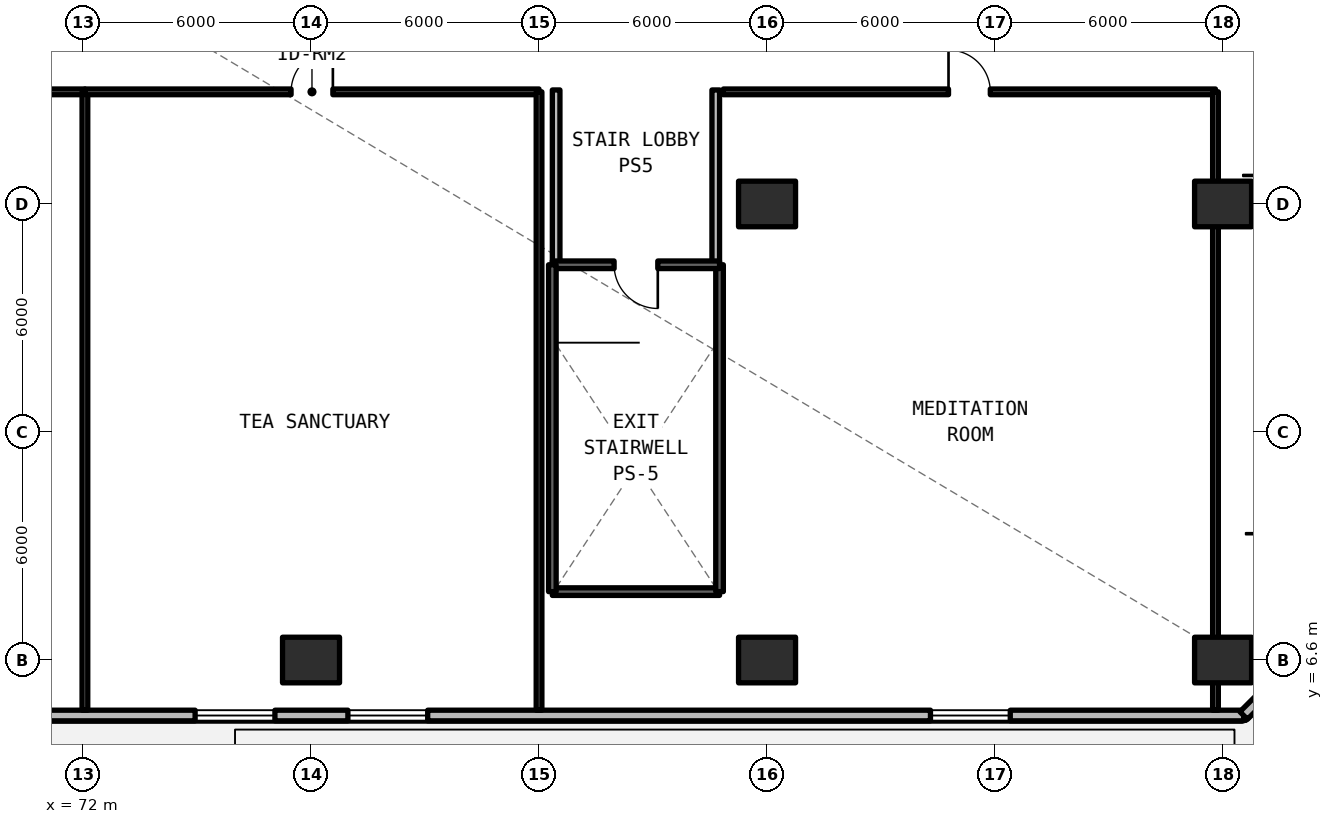
"""IFC4 building model, lengths in metres.
Left out: names, types, materials, properties, quantities, classifications, styles, units other than length and angle.
Written with IfcOpenShell. Run it as: python <this file> out.ifc"""

import sys

from ifc_helpers import new_model, si_unit, direction, frame, frame_2d, origin, origin_2d, place, context, subcontext, project, spatial, rectangle, extrude, element, fill, save


model = new_model("IFC4")
c1 = context("Model", 3, precision=1e-05, world=origin(), true_north=direction((0.0, 1.0)))
c2 = subcontext(c1, "Body", "Model", "MODEL_VIEW")
j1 = project(units=[si_unit("LENGTHUNIT", "METRE"), si_unit("PLANEANGLEUNIT", "RADIAN")], contexts=[c1])
p1 = place(None, origin())
s1 = spatial("IfcSite", under=j1, at=p1, CompositionType="ELEMENT")
p2 = place(p1, origin())
s2 = spatial("IfcBuilding", under=s1, at=p2, CompositionType="ELEMENT")
p3 = place(p2, frame((0.0, 0.0, 24.09)))
s3 = spatial("IfcBuildingStorey", under=s2, at=p3, CompositionType="ELEMENT", Elevation=24.09)
for number, where, z_axis, x_axis in (
    (1, (78.0, 6.6, 0.0), (0.0, 0.0, 1.0), (1.0, 0.0, 0.0)),
    (2, (90.0, 6.6, 0.0), (0.0, 0.0, 1.0), (1.0, 0.0, 0.0)),
    (3, (102.0, 6.6, 0.0), (0.0, 0.0, 1.0), (1.0, 0.0, 0.0)),
):
    element("IfcColumn", number, at=place(p3, frame(where, z_axis=z_axis, x_axis=x_axis)), inside=s3, PredefinedType="COLUMN", context=c2, shape_type="SweptSolid", body=[
        extrude(rectangle(XDim=1.5, YDim=1.2, at=origin_2d()), origin(), (0.0, 0.0, 1.0), 4.71),
    ])
p4 = place(p3, frame((90.0, 18.6, 0.0), z_axis=(0.0, 0.0, 1.0), x_axis=(1.0, 0.0, 0.0)))
e4 = element("IfcColumn", 4, at=p4, inside=s3, PredefinedType="COLUMN", context=c2, shape_type="SweptSolid", body=[
    extrude(rectangle(XDim=1.5, YDim=1.2, at=origin_2d()), origin(), (0.0, 0.0, 1.0), 4.95),
])
p5 = place(p3, frame((102.0, 18.6, 0.0), z_axis=(0.0, 0.0, 1.0), x_axis=(1.0, 0.0, 0.0)))
e5 = element("IfcColumn", 5, at=p5, inside=s3, PredefinedType="COLUMN", context=c2, shape_type="SweptSolid", body=[
    extrude(rectangle(XDim=1.5, YDim=1.2, at=origin_2d()), origin(), (0.0, 0.0, 1.0), 4.71),
])
p6 = place(p3, frame((11.458, 5.14, 0.0), z_axis=(0.0, 0.0, 1.0), x_axis=(1.0, 0.0, 0.0)))
e6 = element("IfcWall", 6, at=p6, inside=s3, PredefinedType="SOLIDWALL", context=c2, shape_type="SweptSolid", body=[
    extrude(rectangle(XDim=91.084, YDim=0.28, at=frame_2d((45.542, 0.0))), origin(), (0.0, 0.0, 1.0), 4.71),
])
p7 = place(p6, frame((44.792, 0.0, 0.0)))
e7 = element("IfcOpeningElement", 7, at=p7, cuts=e6, PredefinedType="OPENING", context=c2, shape_type="SweptSolid", body=[
    extrude(rectangle(XDim=1.5, YDim=2.2, at=frame_2d((0.75, 1.1))), frame((0.0, 0.15, 0.0), z_axis=(0.0, -1.0, 0.0), x_axis=(1.0, 0.0, 0.0)), (0.0, 0.0, 1.0), 0.3),
])
p8 = place(p6, frame((25.582, 0.0, 0.78)))
e8 = element("IfcOpeningElement", 8, at=p8, cuts=e6, PredefinedType="OPENING", context=c2, shape_type="SweptSolid", body=[
    extrude(rectangle(XDim=2.1, YDim=1.66, at=frame_2d((1.05, 0.83))), frame((0.0, 0.15, 0.0), z_axis=(0.0, -1.0, 0.0), x_axis=(1.0, 0.0, 0.0)), (0.0, 0.0, 1.0), 0.3),
])
p9 = place(p6, frame((67.512, 0.0, 0.78)))
e9 = element("IfcOpeningElement", 9, at=p9, cuts=e6, PredefinedType="OPENING", context=c2, shape_type="SweptSolid", body=[
    extrude(rectangle(XDim=2.1, YDim=1.66, at=frame_2d((1.05, 0.83))), frame((0.0, 0.15, 0.0), z_axis=(0.0, -1.0, 0.0), x_axis=(1.0, 0.0, 0.0)), (0.0, 0.0, 1.0), 0.3),
])
p10 = place(p6, frame((5.892, 0.0, 0.78)))
e10 = element("IfcOpeningElement", 10, at=p10, cuts=e6, PredefinedType="OPENING", context=c2, shape_type="SweptSolid", body=[
    extrude(rectangle(XDim=2.1, YDim=1.66, at=frame_2d((1.05, 0.83))), frame((0.0, 0.15, 0.0), z_axis=(0.0, -1.0, 0.0), x_axis=(1.0, 0.0, 0.0)), (0.0, 0.0, 1.0), 0.3),
])
p11 = place(p6, frame((82.842, 0.0, 0.78)))
e11 = element("IfcOpeningElement", 11, at=p11, cuts=e6, PredefinedType="OPENING", context=c2, shape_type="SweptSolid", body=[
    extrude(rectangle(XDim=2.1, YDim=1.66, at=frame_2d((1.05, 0.83))), frame((0.0, 0.15, 0.0), z_axis=(0.0, -1.0, 0.0), x_axis=(1.0, 0.0, 0.0)), (0.0, 0.0, 1.0), 0.3),
])
p12 = place(p6, frame((14.892, 0.0, 0.78)))
e12 = element("IfcOpeningElement", 12, at=p12, cuts=e6, PredefinedType="OPENING", context=c2, shape_type="SweptSolid", body=[
    extrude(rectangle(XDim=2.1, YDim=1.66, at=frame_2d((1.05, 0.83))), frame((0.0, 0.15, 0.0), z_axis=(0.0, -1.0, 0.0), x_axis=(1.0, 0.0, 0.0)), (0.0, 0.0, 1.0), 0.3),
])
p13 = place(p6, frame((53.992, 0.0, 0.78)))
e13 = element("IfcOpeningElement", 13, at=p13, cuts=e6, PredefinedType="OPENING", context=c2, shape_type="SweptSolid", body=[
    extrude(rectangle(XDim=2.1, YDim=1.66, at=frame_2d((1.05, 0.83))), frame((0.0, 0.15, 0.0), z_axis=(0.0, -1.0, 0.0), x_axis=(1.0, 0.0, 0.0)), (0.0, 0.0, 1.0), 0.3),
])
p14 = place(p6, frame((63.492, 0.0, 0.78)))
e14 = element("IfcOpeningElement", 14, at=p14, cuts=e6, PredefinedType="OPENING", context=c2, shape_type="SweptSolid", body=[
    extrude(rectangle(XDim=2.1, YDim=1.66, at=frame_2d((1.05, 0.83))), frame((0.0, 0.15, 0.0), z_axis=(0.0, -1.0, 0.0), x_axis=(1.0, 0.0, 0.0)), (0.0, 0.0, 1.0), 0.3),
])
p15 = place(p3, frame((102.542, 5.14, 0.0), z_axis=(0.0, 0.0, 1.0), x_axis=(0.707106781187, 0.707106781187, 0.0)))
e15 = element("IfcWall", 15, at=p15, inside=s3, PredefinedType="SOLIDWALL", context=c2, shape_type="SweptSolid", body=[
    extrude(rectangle(XDim=3.278, YDim=0.28, at=frame_2d((1.639, 0.0))), origin(), (0.0, 0.0, 1.0), 4.71),
])
p16 = place(p15, frame((1.534, 0.0, 0.78)))
e16 = element("IfcOpeningElement", 16, at=p16, cuts=e15, PredefinedType="OPENING", context=c2, shape_type="SweptSolid", body=[
    extrude(rectangle(XDim=0.85, YDim=1.65, at=frame_2d((0.425, 0.825))), frame((0.0, 0.15, 0.0), z_axis=(0.0, -1.0, 0.0), x_axis=(1.0, 0.0, 0.0)), (0.0, 0.0, 1.0), 0.3),
])
for number, where, z_axis, x_axis in (
    (17, (84.45, 17.0, 0.0), (0.0, 0.0, 1.0), (0.0, 1.0, 0.0)),
    (18, (88.65, 17.0, 0.0), (0.0, 0.0, 1.0), (0.0, 1.0, 0.0)),
):
    element("IfcWall", number, at=place(p3, frame(where, z_axis=z_axis, x_axis=x_axis)), inside=s3, PredefinedType="SOLIDWALL", context=c2, shape_type="SweptSolid", body=[
        extrude(rectangle(XDim=4.6, YDim=0.2, at=frame_2d((2.3, 0.0))), origin(), (0.0, 0.0, 1.0), 3.93),
    ])
p17 = place(p3, frame((48.75, 21.55, 0.0), z_axis=(0.0, 0.0, 1.0), x_axis=(1.0, 0.0, 0.0)))
e19 = element("IfcWall", 19, at=p17, inside=s3, PredefinedType="SOLIDWALL", context=c2, shape_type="SweptSolid", body=[
    extrude(rectangle(XDim=23.3, YDim=0.15, at=frame_2d((11.65, 0.0))), origin(), (0.0, 0.0, 1.0), 3.93),
])
p18 = place(p17, frame((10.8, 0.0, 0.0)))
e20 = element("IfcOpeningElement", 20, at=p18, cuts=e19, PredefinedType="OPENING", context=c2, shape_type="SweptSolid", body=[
    extrude(rectangle(XDim=1.4, YDim=2.15, at=frame_2d((0.7, 1.075))), frame((0.0, 0.085, 0.0), z_axis=(0.0, -1.0, 0.0), x_axis=(1.0, 0.0, 0.0)), (0.0, 0.0, 1.0), 0.17),
])
p19 = place(p3, frame((72.05, 5.28, 0.0), z_axis=(0.0, 0.0, 1.0), x_axis=(0.0, 1.0, 0.0)))
e21 = element("IfcWall", 21, at=p19, inside=s3, PredefinedType="SOLIDWALL", context=c2, shape_type="SweptSolid", body=[
    extrude(rectangle(XDim=16.27, YDim=0.15, at=frame_2d((8.135, 0.0))), origin(), (0.0, 0.0, 1.0), 3.687),
])
p20 = place(p3, frame((72.05, 21.55, 0.0), z_axis=(0.0, 0.0, 1.0), x_axis=(1.0, 0.0, 0.0)))
e22 = element("IfcWall", 22, at=p20, inside=s3, PredefinedType="SOLIDWALL", context=c2, shape_type="SweptSolid", body=[
    extrude(rectangle(XDim=11.95, YDim=0.15, at=frame_2d((5.975, 0.0))), origin(), (0.0, 0.0, 1.0), 3.93),
])
p21 = place(p20, frame((5.425, 0.0, 0.0)))
e23 = element("IfcOpeningElement", 23, at=p21, cuts=e22, PredefinedType="OPENING", context=c2, shape_type="SweptSolid", body=[
    extrude(rectangle(XDim=1.1, YDim=2.15, at=frame_2d((0.55, 1.075))), frame((0.0, 0.085, 0.0), z_axis=(0.0, -1.0, 0.0), x_axis=(1.0, 0.0, 0.0)), (0.0, 0.0, 1.0), 0.17),
])
p22 = place(p3, frame((84.0, 5.28, 0.0), z_axis=(0.0, 0.0, 1.0), x_axis=(0.0, 1.0, 0.0)))
e24 = element("IfcWall", 24, at=p22, inside=s3, PredefinedType="SOLIDWALL", context=c2, shape_type="SweptSolid", body=[
    extrude(rectangle(XDim=16.27, YDim=0.15, at=frame_2d((8.135, 0.0))), origin(), (0.0, 0.0, 1.0), 3.687),
])
p23 = place(p3, frame((88.85, 21.55, 0.0), z_axis=(0.0, 0.0, 1.0), x_axis=(1.0, 0.0, 0.0)))
e25 = element("IfcWall", 25, at=p23, inside=s3, PredefinedType="SOLIDWALL", context=c2, shape_type="SweptSolid", body=[
    extrude(rectangle(XDim=12.95, YDim=0.15, at=frame_2d((6.475, 0.0))), origin(), (0.0, 0.0, 1.0), 3.93),
])
p24 = place(p23, frame((5.925, 0.0, 0.0)))
e26 = element("IfcOpeningElement", 26, at=p24, cuts=e25, PredefinedType="OPENING", context=c2, shape_type="SweptSolid", body=[
    extrude(rectangle(XDim=1.1, YDim=2.15, at=frame_2d((0.55, 1.075))), frame((0.0, 0.085, 0.0), z_axis=(0.0, -1.0, 0.0), x_axis=(1.0, 0.0, 0.0)), (0.0, 0.0, 1.0), 0.17),
])
p25 = place(p3, frame((101.8, 5.28, 0.0), z_axis=(0.0, 0.0, 1.0), x_axis=(0.0, 1.0, 0.0)))
e27 = element("IfcWall", 27, at=p25, inside=s3, PredefinedType="SOLIDWALL", context=c2, shape_type="SweptSolid", body=[
    extrude(rectangle(XDim=16.27, YDim=0.15, at=frame_2d((8.135, 0.0))), origin(), (0.0, 0.0, 1.0), 3.93),
])
p26 = place(p3, frame((84.35, 8.4, 0.0), z_axis=(0.0, 0.0, 1.0), x_axis=(1.0, 0.0, 0.0)))
e28 = element("IfcWall", 28, at=p26, inside=s3, PredefinedType="SOLIDWALL", context=c2, shape_type="SweptSolid", body=[
    extrude(rectangle(XDim=4.4, YDim=0.2, at=frame_2d((2.2, 0.0))), origin(), (0.0, 0.0, 1.0), 4.95),
])
p27 = place(p3, frame((88.75, 8.4, 0.0), z_axis=(0.0, 0.0, 1.0), x_axis=(0.0, 1.0, 0.0)))
e29 = element("IfcWall", 29, at=p27, inside=s3, PredefinedType="SOLIDWALL", context=c2, shape_type="SweptSolid", body=[
    extrude(rectangle(XDim=8.6, YDim=0.2, at=frame_2d((4.3, 0.0))), origin(), (0.0, 0.0, 1.0), 4.95),
])
p28 = place(p3, frame((88.75, 17.0, 0.0), z_axis=(0.0, 0.0, 1.0), x_axis=(-1.0, 0.0, 0.0)))
e30 = element("IfcWall", 30, at=p28, inside=s3, PredefinedType="SOLIDWALL", context=c2, shape_type="SweptSolid", body=[
    extrude(rectangle(XDim=4.4, YDim=0.2, at=frame_2d((2.2, 0.0))), origin(), (0.0, 0.0, 1.0), 4.95),
])
p29 = place(p28, frame((1.625, 0.0, 0.0)))
e31 = element("IfcOpeningElement", 31, at=p29, cuts=e30, PredefinedType="OPENING", context=c2, shape_type="SweptSolid", body=[
    extrude(rectangle(XDim=1.15, YDim=2.15, at=frame_2d((0.575, 1.075))), frame((0.0, 0.11, 0.0), z_axis=(0.0, -1.0, 0.0), x_axis=(1.0, 0.0, 0.0)), (0.0, 0.0, 1.0), 0.22),
])
p30 = place(p3, frame((84.35, 17.0, 0.0), z_axis=(0.0, 0.0, 1.0), x_axis=(0.0, -1.0, 0.0)))
e32 = element("IfcWall", 32, at=p30, inside=s3, PredefinedType="SOLIDWALL", context=c2, shape_type="SweptSolid", body=[
    extrude(rectangle(XDim=8.6, YDim=0.2, at=frame_2d((4.3, 0.0))), origin(), (0.0, 0.0, 1.0), 4.95),
])
p31 = place(p9, origin())
e33 = element("IfcWindow", 33, at=p31, inside=s3, PartitioningType="SINGLE_PANEL", PredefinedType="WINDOW", context=c2, shape_type="SweptSolid", body=[
    extrude(rectangle(XDim=2.1, YDim=1.66, at=frame_2d((1.05, 0.83))), frame((0.0, 0.03, 0.0), z_axis=(0.0, -1.0, 0.0), x_axis=(1.0, 0.0, 0.0)), (0.0, 0.0, 1.0), 0.06),
])
fill(e9, e33)
p32 = place(p11, origin())
e34 = element("IfcWindow", 34, at=p32, inside=s3, PartitioningType="SINGLE_PANEL", PredefinedType="WINDOW", context=c2, shape_type="SweptSolid", body=[
    extrude(rectangle(XDim=2.1, YDim=1.66, at=frame_2d((1.05, 0.83))), frame((0.0, 0.03, 0.0), z_axis=(0.0, -1.0, 0.0), x_axis=(1.0, 0.0, 0.0)), (0.0, 0.0, 1.0), 0.06),
])
fill(e11, e34)
p33 = place(p14, origin())
e35 = element("IfcWindow", 35, at=p33, inside=s3, PartitioningType="SINGLE_PANEL", PredefinedType="WINDOW", context=c2, shape_type="SweptSolid", body=[
    extrude(rectangle(XDim=2.1, YDim=1.66, at=frame_2d((1.05, 0.83))), frame((0.0, 0.03, 0.0), z_axis=(0.0, -1.0, 0.0), x_axis=(1.0, 0.0, 0.0)), (0.0, 0.0, 1.0), 0.06),
])
fill(e14, e35)
p34 = place(p21, origin())
e36 = element("IfcDoor", 36, at=p34, inside=s3, OperationType="SINGLE_SWING_RIGHT", PredefinedType="DOOR", context=c2, shape_type="SweptSolid", body=[
    extrude(rectangle(XDim=1.1, YDim=2.15, at=frame_2d((0.55, 1.075))), frame((0.0, 0.025, 0.0), z_axis=(0.0, -1.0, 0.0), x_axis=(1.0, 0.0, 0.0)), (0.0, 0.0, 1.0), 0.05),
])
fill(e23, e36)
p35 = place(p24, origin())
e37 = element("IfcDoor", 37, at=p35, inside=s3, OperationType="SINGLE_SWING_LEFT", PredefinedType="DOOR", context=c2, shape_type="SweptSolid", body=[
    extrude(rectangle(XDim=1.1, YDim=2.15, at=frame_2d((0.55, 1.075))), frame((0.0, 0.025, 0.0), z_axis=(0.0, -1.0, 0.0), x_axis=(1.0, 0.0, 0.0)), (0.0, 0.0, 1.0), 0.05),
])
fill(e26, e37)
p36 = place(p29, origin())
e38 = element("IfcDoor", 38, at=p36, inside=s3, OperationType="SINGLE_SWING_RIGHT", PredefinedType="DOOR", context=c2, shape_type="SweptSolid", body=[
    extrude(rectangle(XDim=1.15, YDim=2.15, at=frame_2d((0.575, 1.075))), frame((0.0, 0.025, 0.0), z_axis=(0.0, -1.0, 0.0), x_axis=(1.0, 0.0, 0.0)), (0.0, 0.0, 1.0), 0.05),
])
fill(e31, e38)
save(model, sys.argv[1])
